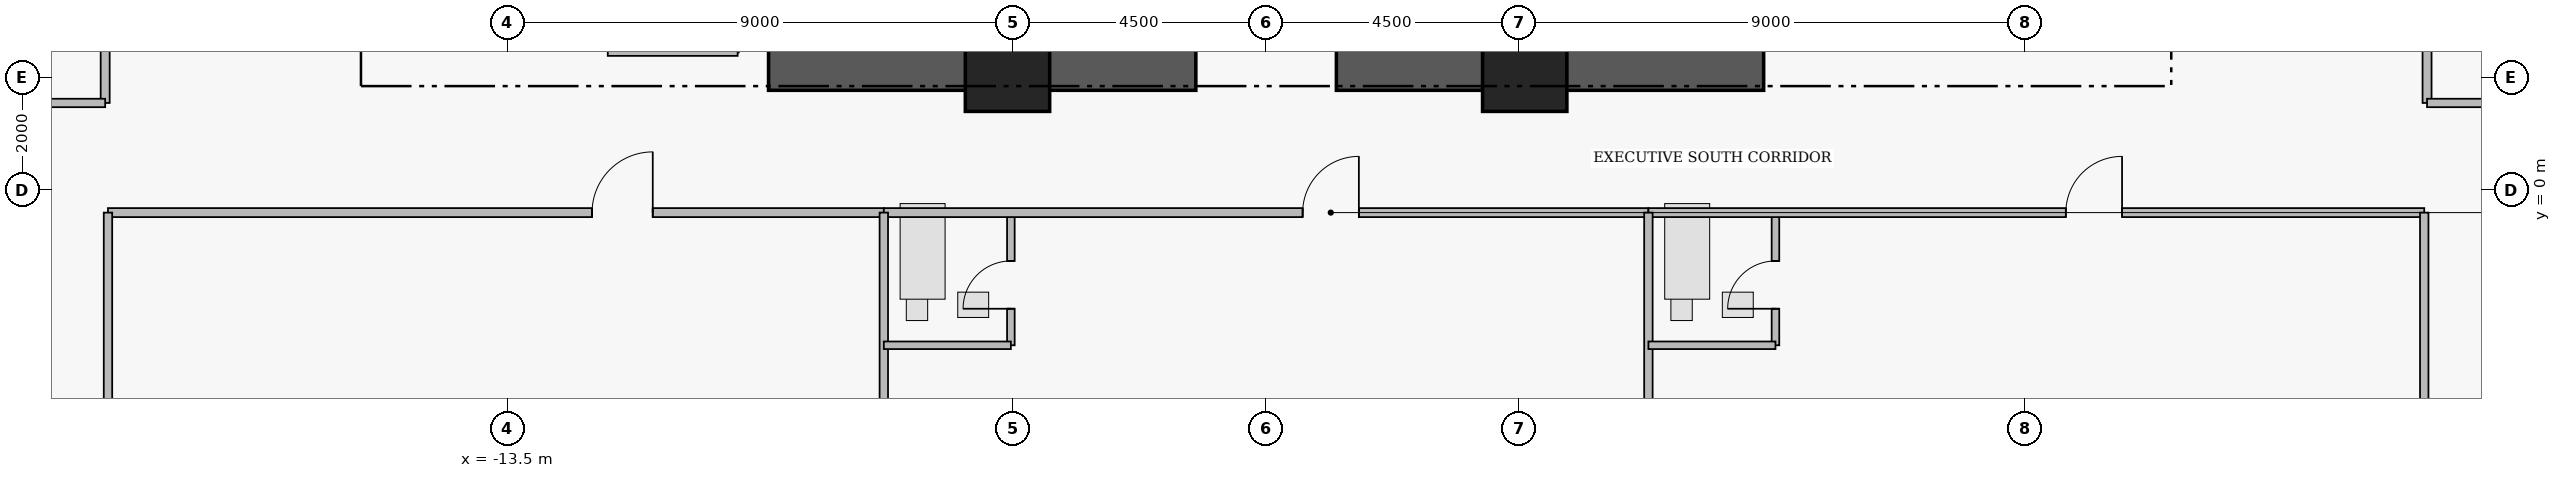
"""IFC4 building model, lengths in metres.
Left out: names, types, materials, properties, quantities, classifications, styles, units other than length and angle.
Written with IfcOpenShell. Run it as: python <this file> out.ifc"""

import sys

from ifc_helpers import new_model, si_unit, direction, frame, frame_2d, origin, origin_2d, place, context, subcontext, project, spatial, rectangle, extrude, element, fill, save


model = new_model("IFC4")
c1 = context("Model", 3, precision=1e-05, world=origin(), true_north=direction((0.0, 1.0)))
c2 = subcontext(c1, "Body", "Model", "MODEL_VIEW")
j1 = project(units=[si_unit("LENGTHUNIT", "METRE"), si_unit("PLANEANGLEUNIT", "RADIAN")], contexts=[c1])
p1 = place(None, origin())
s1 = spatial("IfcSite", under=j1, at=p1, CompositionType="ELEMENT")
p2 = place(p1, origin())
s2 = spatial("IfcBuilding", under=s1, at=p2, CompositionType="ELEMENT")
p3 = place(p2, frame((0.0, 0.0, 106.6)))
s3 = spatial("IfcBuildingStorey", under=s2, at=p3, CompositionType="ELEMENT", Elevation=106.6)
for number, where, z_axis, x_axis in (
    (1, (-8.85, 2.15, 0.0), (0.0, 0.0, 1.0), (1.0, 0.0, 0.0)),
    (2, (1.25, 2.15, 0.0), (0.0, 0.0, 1.0), (1.0, 0.0, 0.0)),
):
    element("IfcWall", number, at=place(p3, frame(where, z_axis=z_axis, x_axis=x_axis)), inside=s3, PredefinedType="SHEAR", context=c2, shape_type="SweptSolid", body=[
        extrude(rectangle(XDim=7.6, YDim=0.75, at=frame_2d((3.8, 0.0))), origin(), (0.0, 0.0, 1.0), 3.43),
    ])
for number, where, z_axis, x_axis in (
    (3, (-4.6, 2.15, 0.0), (0.0, 0.0, 1.0), (1.0, 0.0, 0.0)),
    (4, (4.6, 2.15, 0.0), (0.0, 0.0, 1.0), (1.0, 0.0, 0.0)),
):
    element("IfcColumn", number, at=place(p3, frame(where, z_axis=z_axis, x_axis=x_axis)), inside=s3, PredefinedType="COLUMN", context=c2, shape_type="SweptSolid", body=[
        extrude(rectangle(XDim=1.5, YDim=1.5, at=origin_2d()), origin(), (0.0, 0.0, 1.0), 3.65),
    ])
p4 = place(p3, frame((-20.6, -0.4, 0.0), z_axis=(0.0, 0.0, 1.0), x_axis=(1.0, 0.0, 0.0)))
e5 = element("IfcWall", 5, at=p4, inside=s3, PredefinedType="PARTITIONING", context=c2, shape_type="SweptSolid", body=[
    extrude(rectangle(XDim=13.8, YDim=0.16, at=frame_2d((6.9, 0.0))), origin(), (0.0, 0.0, 1.0), 3.43),
])
p5 = place(p4, frame((8.61, 0.0, 0.0)))
e6 = element("IfcOpeningElement", 6, at=p5, cuts=e5, PredefinedType="OPENING", context=c2, shape_type="SweptSolid", body=[
    extrude(rectangle(XDim=1.08, YDim=2.18, at=frame_2d((0.54, 1.09))), frame((0.0, 0.09, 0.0), z_axis=(0.0, -1.0, 0.0), x_axis=(1.0, 0.0, 0.0)), (0.0, 0.0, 1.0), 0.18),
])
p6 = place(p3, frame((-4.54, -2.76, 0.0), z_axis=(0.0, 0.0, 1.0), x_axis=(0.0, 1.0, 0.0)))
e7 = element("IfcWall", 7, at=p6, inside=s3, PredefinedType="PLUMBINGWALL", context=c2, shape_type="SweptSolid", body=[
    extrude(rectangle(XDim=2.36, YDim=0.135, at=frame_2d((1.18, 0.0))), origin(), (0.0, 0.0, 1.0), 2.747),
])
p7 = place(p6, frame((0.65, 0.0, 0.0)))
e8 = element("IfcOpeningElement", 8, at=p7, cuts=e7, PredefinedType="OPENING", context=c2, shape_type="SweptSolid", body=[
    extrude(rectangle(XDim=0.85, YDim=2.1, at=frame_2d((0.425, 1.05))), frame((0.0, 0.077, 0.0), z_axis=(0.0, -1.0, 0.0), x_axis=(1.0, 0.0, 0.0)), (0.0, 0.0, 1.0), 0.155),
])
p8 = place(p3, frame((-6.8, -0.4, 0.0), z_axis=(0.0, 0.0, 1.0), x_axis=(1.0, 0.0, 0.0)))
e9 = element("IfcWall", 9, at=p8, inside=s3, PredefinedType="PARTITIONING", context=c2, shape_type="SweptSolid", body=[
    extrude(rectangle(XDim=13.6, YDim=0.16, at=frame_2d((6.8, 0.0))), origin(), (0.0, 0.0, 1.0), 3.43),
])
p9 = place(p8, frame((7.45, 0.0, 0.0)))
e10 = element("IfcOpeningElement", 10, at=p9, cuts=e9, PredefinedType="OPENING", context=c2, shape_type="SweptSolid", body=[
    extrude(rectangle(XDim=1.0, YDim=2.15, at=frame_2d((0.5, 1.075))), frame((0.0, 0.09, 0.0), z_axis=(0.0, -1.0, 0.0), x_axis=(1.0, 0.0, 0.0)), (0.0, 0.0, 1.0), 0.18),
])
p10 = place(p3, frame((9.06, -2.76, 0.0), z_axis=(0.0, 0.0, 1.0), x_axis=(0.0, 1.0, 0.0)))
e11 = element("IfcWall", 11, at=p10, inside=s3, PredefinedType="PLUMBINGWALL", context=c2, shape_type="SweptSolid", body=[
    extrude(rectangle(XDim=2.36, YDim=0.135, at=frame_2d((1.18, 0.0))), origin(), (0.0, 0.0, 1.0), 3.43),
])
p11 = place(p10, frame((0.65, 0.0, 0.0)))
e12 = element("IfcOpeningElement", 12, at=p11, cuts=e11, PredefinedType="OPENING", context=c2, shape_type="SweptSolid", body=[
    extrude(rectangle(XDim=0.85, YDim=2.1, at=frame_2d((0.425, 1.05))), frame((0.0, 0.077, 0.0), z_axis=(0.0, -1.0, 0.0), x_axis=(1.0, 0.0, 0.0)), (0.0, 0.0, 1.0), 0.155),
])
p12 = place(p3, frame((6.8, -0.4, 0.0), z_axis=(0.0, 0.0, 1.0), x_axis=(1.0, 0.0, 0.0)))
e13 = element("IfcWall", 13, at=p12, inside=s3, PredefinedType="PARTITIONING", context=c2, shape_type="SweptSolid", body=[
    extrude(rectangle(XDim=13.8, YDim=0.16, at=frame_2d((6.9, 0.0))), origin(), (0.0, 0.0, 1.0), 3.43),
])
p13 = place(p12, frame((7.425, 0.0, 0.0)))
e14 = element("IfcOpeningElement", 14, at=p13, cuts=e13, PredefinedType="OPENING", context=c2, shape_type="SweptSolid", body=[
    extrude(rectangle(XDim=1.0, YDim=2.15, at=frame_2d((0.5, 1.075))), frame((0.0, 0.09, 0.0), z_axis=(0.0, -1.0, 0.0), x_axis=(1.0, 0.0, 0.0)), (0.0, 0.0, 1.0), 0.18),
])
p14 = place(p3, frame((20.65, 1.55, 0.0), z_axis=(0.0, 0.0, 1.0), x_axis=(0.0, 1.0, 0.0)))
e15 = element("IfcWall", 15, at=p14, inside=s3, PredefinedType="PARTITIONING", context=c2, shape_type="SweptSolid", body=[
    extrude(rectangle(XDim=5.2, YDim=0.16, at=frame_2d((2.6, 0.0))), origin(), (0.0, 0.0, 1.0), 3.43),
])
p15 = place(p14, frame((2.14, 0.0, 0.0)))
e16 = element("IfcOpeningElement", 16, at=p15, cuts=e15, PredefinedType="OPENING", context=c2, shape_type="SweptSolid", body=[
    extrude(rectangle(XDim=0.92, YDim=2.12, at=frame_2d((0.46, 1.06))), frame((0.0, 0.09, 0.0), z_axis=(0.0, -1.0, 0.0), x_axis=(1.0, 0.0, 0.0)), (0.0, 0.0, 1.0), 0.18),
])
p16 = place(p3, frame((-20.65, 1.55, 0.0), z_axis=(0.0, 0.0, 1.0), x_axis=(0.0, 1.0, 0.0)))
e17 = element("IfcWall", 17, at=p16, inside=s3, PredefinedType="PARTITIONING", context=c2, shape_type="SweptSolid", body=[
    extrude(rectangle(XDim=5.2, YDim=0.16, at=frame_2d((2.6, 0.0))), origin(), (0.0, 0.0, 1.0), 3.43),
])
p17 = place(p16, frame((2.125, 0.0, 0.0)))
e18 = element("IfcOpeningElement", 18, at=p17, cuts=e17, PredefinedType="OPENING", context=c2, shape_type="SweptSolid", body=[
    extrude(rectangle(XDim=0.95, YDim=2.15, at=frame_2d((0.475, 1.075))), frame((0.0, 0.09, 0.0), z_axis=(0.0, -1.0, 0.0), x_axis=(1.0, 0.0, 0.0)), (0.0, 0.0, 1.0), 0.18),
])
p18 = place(p3, frame((-11.71, 2.47, 0.0), z_axis=(0.0, 0.0, 1.0), x_axis=(1.0, 0.0, 0.0)))
e19 = element("IfcWall", 19, at=p18, inside=s3, PredefinedType="PARTITIONING", context=c2, shape_type="SweptSolid", body=[
    extrude(rectangle(XDim=2.31, YDim=0.165, at=frame_2d((1.155, 0.0))), origin(), (0.0, 0.0, 1.0), 2.03),
])
p19 = place(p3, frame((-20.6, -11.84, 0.0), z_axis=(0.0, 0.0, 1.0), x_axis=(0.0, 1.0, 0.0)))
e20 = element("IfcWall", 20, at=p19, inside=s3, PredefinedType="PARTITIONING", context=c2, shape_type="SweptSolid", body=[
    extrude(rectangle(XDim=11.44, YDim=0.15, at=frame_2d((5.72, 0.0))), origin(), (0.0, 0.0, 1.0), 3.43),
])
p20 = place(p3, frame((-6.8, -15.34, 0.0), z_axis=(0.0, 0.0, 1.0), x_axis=(0.0, 1.0, 0.0)))
e21 = element("IfcWall", 21, at=p20, inside=s3, PredefinedType="PARTITIONING", context=c2, shape_type="SweptSolid", body=[
    extrude(rectangle(XDim=14.94, YDim=0.15, at=frame_2d((7.47, 0.0))), origin(), (0.0, 0.0, 1.0), 3.43),
])
p21 = place(p3, frame((-6.8, -2.76, 0.0), z_axis=(0.0, 0.0, 1.0), x_axis=(1.0, 0.0, 0.0)))
e22 = element("IfcWall", 22, at=p21, inside=s3, PredefinedType="PLUMBINGWALL", context=c2, shape_type="SweptSolid", body=[
    extrude(rectangle(XDim=2.26, YDim=0.135, at=frame_2d((1.13, 0.0))), origin(), (0.0, 0.0, 1.0), 3.43),
])
p22 = place(p3, frame((6.8, -15.32, 0.0), z_axis=(0.0, 0.0, 1.0), x_axis=(0.0, 1.0, 0.0)))
e23 = element("IfcWall", 23, at=p22, inside=s3, PredefinedType="PARTITIONING", context=c2, shape_type="SweptSolid", body=[
    extrude(rectangle(XDim=14.92, YDim=0.15, at=frame_2d((7.46, 0.0))), origin(), (0.0, 0.0, 1.0), 3.43),
])
p23 = place(p3, frame((6.8, -2.76, 0.0), z_axis=(0.0, 0.0, 1.0), x_axis=(1.0, 0.0, 0.0)))
e24 = element("IfcWall", 24, at=p23, inside=s3, PredefinedType="PLUMBINGWALL", context=c2, shape_type="SweptSolid", body=[
    extrude(rectangle(XDim=2.26, YDim=0.135, at=frame_2d((1.13, 0.0))), origin(), (0.0, 0.0, 1.0), 3.43),
])
p24 = place(p3, frame((20.6, -11.9, 0.0), z_axis=(0.0, 0.0, 1.0), x_axis=(0.0, 1.0, 0.0)))
e25 = element("IfcWall", 25, at=p24, inside=s3, PredefinedType="PARTITIONING", context=c2, shape_type="SweptSolid", body=[
    extrude(rectangle(XDim=11.5, YDim=0.15, at=frame_2d((5.75, 0.0))), origin(), (0.0, 0.0, 1.0), 3.43),
])
for number, where, z_axis, x_axis in (
    (26, (20.65, 1.55, 0.0), (0.0, 0.0, 1.0), (1.0, 0.0, 0.0)),
    (27, (-23.867, 1.55, 0.0), (0.0, 0.0, 1.0), (1.0, 0.0, 0.0)),
):
    element("IfcWall", number, at=place(p3, frame(where, z_axis=z_axis, x_axis=x_axis)), inside=s3, PredefinedType="PARTITIONING", context=c2, shape_type="SweptSolid", body=[
        extrude(rectangle(XDim=3.217, YDim=0.15, at=frame_2d((1.608, 0.0))), origin(), (0.0, 0.0, 1.0), 3.43),
    ])
p25 = place(p5, origin())
e28 = element("IfcDoor", 28, at=p25, inside=s3, OperationType="SINGLE_SWING_RIGHT", PredefinedType="DOOR", context=c2, shape_type="SweptSolid", body=[
    extrude(rectangle(XDim=1.08, YDim=2.18, at=frame_2d((0.54, 1.09))), frame((0.0, 0.025, 0.0), z_axis=(0.0, -1.0, 0.0), x_axis=(1.0, 0.0, 0.0)), (0.0, 0.0, 1.0), 0.05),
])
fill(e6, e28)
p26 = place(p7, origin())
e29 = element("IfcDoor", 29, at=p26, inside=s3, OperationType="SINGLE_SWING_LEFT", PredefinedType="DOOR", context=c2, shape_type="SweptSolid", body=[
    extrude(rectangle(XDim=0.85, YDim=2.1, at=frame_2d((0.425, 1.05))), frame((0.0, 0.025, 0.0), z_axis=(0.0, -1.0, 0.0), x_axis=(1.0, 0.0, 0.0)), (0.0, 0.0, 1.0), 0.05),
])
fill(e8, e29)
p27 = place(p9, origin())
e30 = element("IfcDoor", 30, at=p27, inside=s3, OperationType="SINGLE_SWING_RIGHT", PredefinedType="DOOR", context=c2, shape_type="SweptSolid", body=[
    extrude(rectangle(XDim=1.0, YDim=2.15, at=frame_2d((0.5, 1.075))), frame((0.0, 0.025, 0.0), z_axis=(0.0, -1.0, 0.0), x_axis=(1.0, 0.0, 0.0)), (0.0, 0.0, 1.0), 0.05),
])
fill(e10, e30)
p28 = place(p11, origin())
e31 = element("IfcDoor", 31, at=p28, inside=s3, OperationType="SINGLE_SWING_LEFT", PredefinedType="DOOR", context=c2, shape_type="SweptSolid", body=[
    extrude(rectangle(XDim=0.85, YDim=2.1, at=frame_2d((0.425, 1.05))), frame((0.0, 0.025, 0.0), z_axis=(0.0, -1.0, 0.0), x_axis=(1.0, 0.0, 0.0)), (0.0, 0.0, 1.0), 0.05),
])
fill(e12, e31)
p29 = place(p13, origin())
e32 = element("IfcDoor", 32, at=p29, inside=s3, OperationType="SINGLE_SWING_RIGHT", PredefinedType="DOOR", context=c2, shape_type="SweptSolid", body=[
    extrude(rectangle(XDim=1.0, YDim=2.15, at=frame_2d((0.5, 1.075))), frame((0.0, 0.025, 0.0), z_axis=(0.0, -1.0, 0.0), x_axis=(1.0, 0.0, 0.0)), (0.0, 0.0, 1.0), 0.05),
])
fill(e14, e32)
save(model, sys.argv[1])
